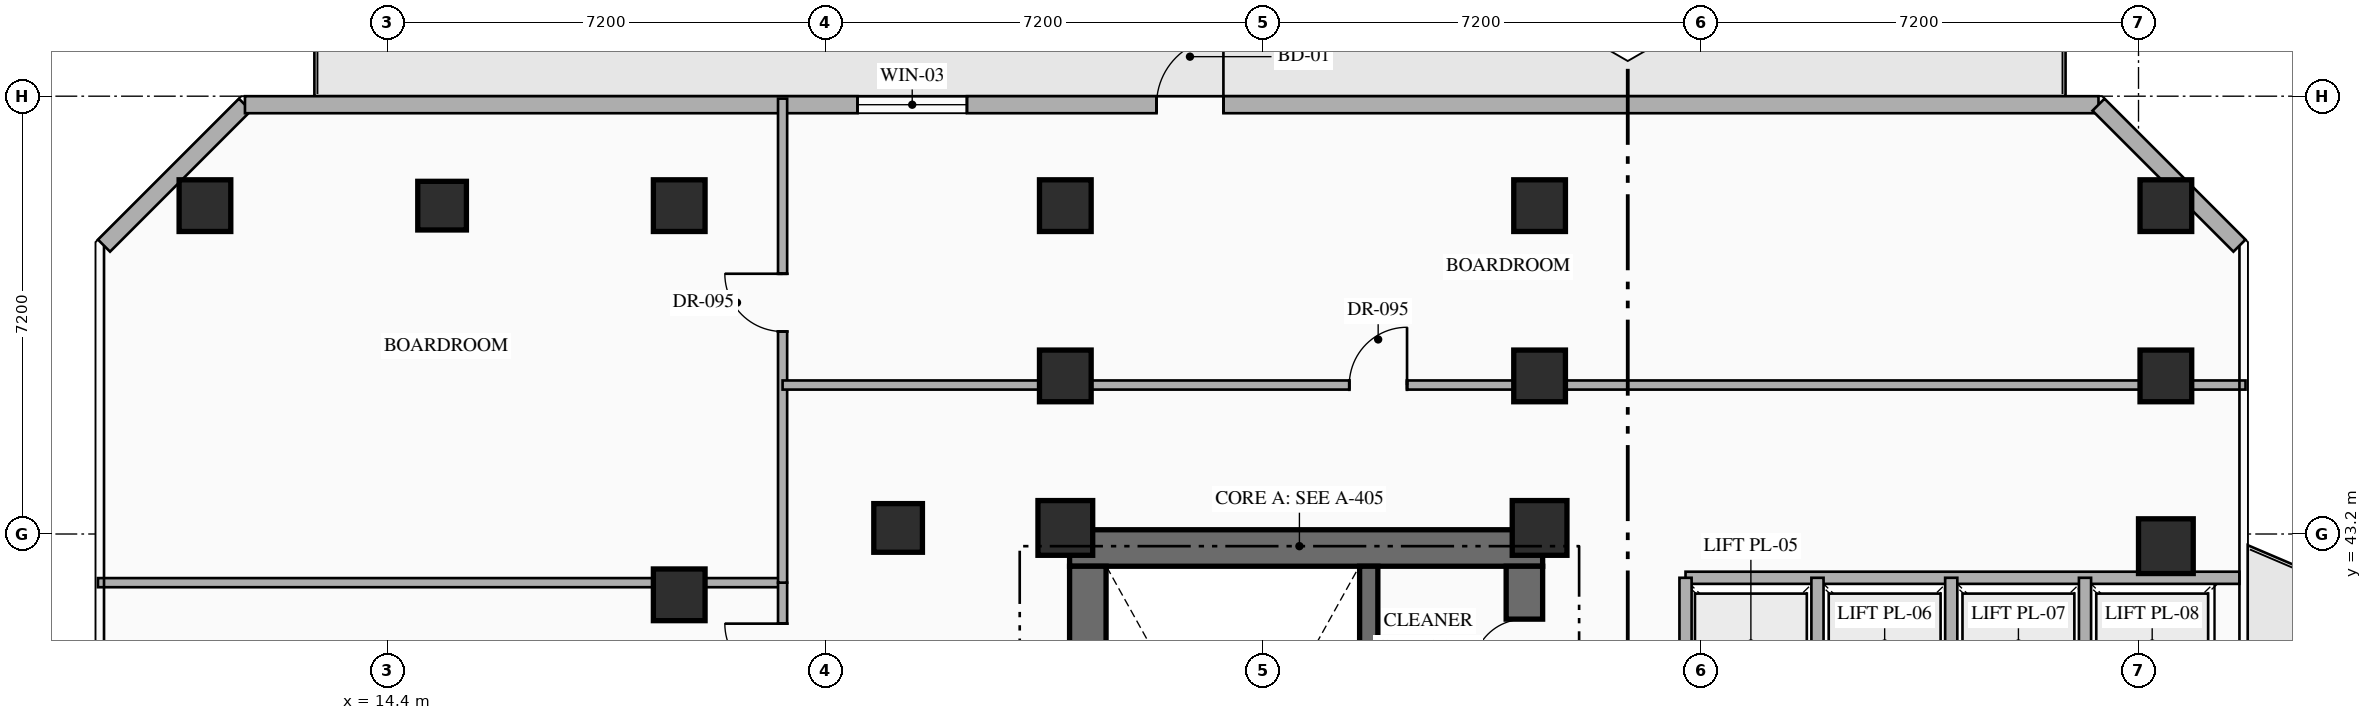
"""IFC4 building model, lengths in metres.
Left out: names, types, materials, properties, quantities, classifications, styles, units other than length and angle.
Written with IfcOpenShell. Run it as: python <this file> out.ifc"""

import sys

from ifc_helpers import new_model, si_unit, direction, frame, frame_2d, origin, origin_2d, place, context, subcontext, project, spatial, rectangle, hollow_rectangle, extrude, element, fill, save


model = new_model("IFC4")
c1 = context("Model", 3, precision=1e-05, world=origin(), true_north=direction((0.0, 1.0)))
c2 = subcontext(c1, "Body", "Model", "MODEL_VIEW")
j1 = project(units=[si_unit("LENGTHUNIT", "METRE"), si_unit("PLANEANGLEUNIT", "RADIAN")], contexts=[c1])
p1 = place(None, origin())
s1 = spatial("IfcSite", under=j1, at=p1, CompositionType="ELEMENT")
p2 = place(p1, origin())
s2 = spatial("IfcBuilding", under=s1, at=p2, CompositionType="ELEMENT")
p3 = place(p2, frame((0.0, 0.0, 130.05)))
s3 = spatial("IfcBuildingStorey", under=s2, at=p3, CompositionType="ELEMENT", Elevation=130.05)
p4 = place(p3, frame((25.62, 42.97, 0.0), z_axis=(0.0, 0.0, 1.0), x_axis=(1.0, 0.0, 0.0)))
e1 = element("IfcWall", 1, at=p4, inside=s3, PredefinedType="SHEAR", context=c2, shape_type="SweptSolid", body=[
    extrude(rectangle(XDim=7.78, YDim=0.6, at=frame_2d((3.89, 0.0))), origin(), (0.0, 0.0, 1.0), 4.8),
])
p5 = place(p3, frame((25.92, 33.19, 0.0), z_axis=(0.0, 0.0, 1.0), x_axis=(0.0, 1.0, 0.0)))
e2 = element("IfcWall", 2, at=p5, inside=s3, PredefinedType="SHEAR", context=c2, shape_type="SweptSolid", body=[
    extrude(rectangle(XDim=9.48, YDim=0.6, at=frame_2d((4.74, 0.0))), origin(), (0.0, 0.0, 1.0), 4.8),
])
p6 = place(p3, frame((33.1, 33.19, 0.0), z_axis=(0.0, 0.0, 1.0), x_axis=(0.0, 1.0, 0.0)))
e3 = element("IfcWall", 3, at=p6, inside=s3, PredefinedType="SHEAR", context=c2, shape_type="SweptSolid", body=[
    extrude(rectangle(XDim=9.48, YDim=0.6, at=frame_2d((4.74, 0.0))), origin(), (0.0, 0.0, 1.0), 4.8),
])
p7 = place(p6, frame((4.71, 0.0, 0.0)))
e4 = element("IfcOpeningElement", 4, at=p7, cuts=e3, PredefinedType="OPENING", context=c2, shape_type="SweptSolid", body=[
    extrude(rectangle(XDim=0.85, YDim=2.08, at=frame_2d((0.425, 1.04))), frame((0.0, 0.31, 0.0), z_axis=(0.0, -1.0, 0.0), x_axis=(1.0, 0.0, 0.0)), (0.0, 0.0, 1.0), 0.62),
])
p8 = place(p6, frame((7.76, 0.0, 0.0)))
e5 = element("IfcOpeningElement", 5, at=p8, cuts=e3, PredefinedType="OPENING", context=c2, shape_type="SweptSolid", body=[
    extrude(rectangle(XDim=0.85, YDim=2.08, at=frame_2d((0.425, 1.04))), frame((0.0, 0.31, 0.0), z_axis=(0.0, -1.0, 0.0), x_axis=(1.0, 0.0, 0.0)), (0.0, 0.0, 1.0), 0.62),
])
p9 = place(p3, frame((30.54, 33.19, 0.0), z_axis=(0.0, 0.0, 1.0), x_axis=(0.0, 1.0, 0.0)))
e6 = element("IfcWall", 6, at=p9, inside=s3, PredefinedType="SHEAR", context=c2, shape_type="SweptSolid", body=[
    extrude(rectangle(XDim=9.48, YDim=0.3, at=frame_2d((4.74, 0.0))), origin(), (0.0, 0.0, 1.0), 4.8),
])
for number, where, z_axis, x_axis in (
    (7, (25.55, 43.3, 0.0), (0.0, 0.0, 1.0), (1.0, 0.0, 0.0)),
    (8, (33.35, 43.3, 0.0), (0.0, 0.0, 1.0), (1.0, 0.0, 0.0)),
    (9, (43.65, 43.0, 0.0), (0.0, 0.0, 1.0), (1.0, 0.0, 0.0)),
):
    element("IfcColumn", number, at=place(p3, frame(where, z_axis=z_axis, x_axis=x_axis)), inside=s3, PredefinedType="COLUMN", context=c2, shape_type="SweptSolid", body=[
        extrude(rectangle(XDim=0.9, YDim=0.9, at=origin_2d()), origin(), (0.0, 0.0, 1.0), 4.8),
    ])
for number, where, z_axis, x_axis in (
    (10, (25.55, 45.8, 0.0), (0.0, 0.0, 1.0), (1.0, 0.0, 0.0)),
    (11, (33.35, 45.8, 0.0), (0.0, 0.0, 1.0), (1.0, 0.0, 0.0)),
    (12, (43.65, 45.8, 0.0), (0.0, 0.0, 1.0), (1.0, 0.0, 0.0)),
    (13, (11.4, 48.6, 0.0), (0.0, 0.0, 1.0), (1.0, 0.0, 0.0)),
    (14, (19.2, 48.6, 0.0), (0.0, 0.0, 1.0), (1.0, 0.0, 0.0)),
    (15, (25.55, 48.6, 0.0), (0.0, 0.0, 1.0), (1.0, 0.0, 0.0)),
    (16, (33.35, 48.6, 0.0), (0.0, 0.0, 1.0), (1.0, 0.0, 0.0)),
    (17, (43.65, 48.6, 0.0), (0.0, 0.0, 1.0), (1.0, 0.0, 0.0)),
    (18, (19.2, 42.2, 0.0), (0.0, 0.0, 1.0), (1.0, 0.0, 0.0)),
):
    element("IfcColumn", number, at=place(p3, frame(where, z_axis=z_axis, x_axis=x_axis)), inside=s3, PredefinedType="COLUMN", context=c2, shape_type="SweptSolid", body=[
        extrude(hollow_rectangle(XDim=0.85, YDim=0.85, WallThickness=0.032, at=origin_2d()), origin(), (0.0, 0.0, 1.0), 4.8),
    ])
for number, where, z_axis, x_axis in (
    (19, (22.8, 43.3, 0.0), (0.0, 0.0, 1.0), (1.0, 0.0, 0.0)),
    (20, (15.3, 48.6, 0.0), (0.0, 0.0, 1.0), (1.0, 0.0, 0.0)),
):
    element("IfcColumn", number, at=place(p3, frame(where, z_axis=z_axis, x_axis=x_axis)), inside=s3, PredefinedType="COLUMN", context=c2, shape_type="SweptSolid", body=[
        extrude(hollow_rectangle(XDim=0.8, YDim=0.8, WallThickness=0.032, at=origin_2d()), origin(), (0.0, 0.0, 1.0), 4.8),
    ])
p10 = place(p3, frame((9.74, 47.942, 0.0), z_axis=(0.0, 0.0, 1.0), x_axis=(0.707106781187, 0.707106781187, 0.0)))
e21 = element("IfcWall", 21, at=p10, inside=s3, PredefinedType="STANDARD", context=c2, shape_type="SweptSolid", body=[
    extrude(rectangle(XDim=3.278, YDim=0.28, at=frame_2d((1.639, 0.0))), origin(), (0.0, 0.0, 1.0), 4.55),
])
p11 = place(p3, frame((12.058, 50.26, 0.0), z_axis=(0.0, 0.0, 1.0), x_axis=(1.0, 0.0, 0.0)))
e22 = element("IfcWall", 22, at=p11, inside=s3, PredefinedType="STANDARD", context=c2, shape_type="SweptSolid", body=[
    extrude(rectangle(XDim=30.484, YDim=0.28, at=frame_2d((15.242, 0.0))), origin(), (0.0, 0.0, 1.0), 4.55),
])
p12 = place(p11, frame((14.992, 0.0, 0.0)))
e23 = element("IfcOpeningElement", 23, at=p12, cuts=e22, PredefinedType="OPENING", context=c2, shape_type="SweptSolid", body=[
    extrude(rectangle(XDim=1.1, YDim=2.2, at=frame_2d((0.55, 1.1))), frame((0.0, 0.15, 0.0), z_axis=(0.0, -1.0, 0.0), x_axis=(1.0, 0.0, 0.0)), (0.0, 0.0, 1.0), 0.3),
])
p13 = place(p11, frame((10.074, 0.0, 0.85)))
e24 = element("IfcOpeningElement", 24, at=p13, cuts=e22, PredefinedType="OPENING", context=c2, shape_type="SweptSolid", body=[
    extrude(rectangle(XDim=1.8, YDim=2.1, at=frame_2d((0.9, 1.05))), frame((0.0, 0.15, 0.0), z_axis=(0.0, -1.0, 0.0), x_axis=(1.0, 0.0, 0.0)), (0.0, 0.0, 1.0), 0.3),
])
p14 = place(p3, frame((42.542, 50.26, 0.0), z_axis=(0.0, 0.0, 1.0), x_axis=(0.707106781187, -0.707106781187, 0.0)))
e25 = element("IfcWall", 25, at=p14, inside=s3, PredefinedType="STANDARD", context=c2, shape_type="SweptSolid", body=[
    extrude(rectangle(XDim=3.278, YDim=0.28, at=frame_2d((1.639, 0.0))), origin(), (0.0, 0.0, 1.0), 4.55),
])
p15 = place(p3, frame((35.75, 42.48, 0.0), z_axis=(0.0, 0.0, 1.0), x_axis=(1.0, 0.0, 0.0)))
e26 = element("IfcWall", 26, at=p15, inside=s3, PredefinedType="STANDARD", context=c2, shape_type="SweptSolid", body=[
    extrude(rectangle(XDim=9.11, YDim=0.2, at=frame_2d((4.555, 0.0))), origin(), (0.0, 0.0, 1.0), 4.55),
])
for number, where, z_axis, x_axis in (
    (27, (35.75, 40.32, 0.0), (0.0, 0.0, 1.0), (0.0, 1.0, 0.0)),
    (28, (37.92, 40.32, 0.0), (0.0, 0.0, 1.0), (0.0, 1.0, 0.0)),
    (29, (40.12, 40.32, 0.0), (0.0, 0.0, 1.0), (0.0, 1.0, 0.0)),
    (30, (42.32, 40.32, 0.0), (0.0, 0.0, 1.0), (0.0, 1.0, 0.0)),
):
    element("IfcWall", number, at=place(p3, frame(where, z_axis=z_axis, x_axis=x_axis)), inside=s3, PredefinedType="STANDARD", context=c2, shape_type="SweptSolid", body=[
        extrude(rectangle(XDim=2.16, YDim=0.2, at=frame_2d((1.08, 0.0))), origin(), (0.0, 0.0, 1.0), 4.55),
    ])
p16 = place(p3, frame((9.64, 42.4, 0.0), z_axis=(0.0, 0.0, 1.0), x_axis=(1.0, 0.0, 0.0)))
e31 = element("IfcWall", 31, at=p16, inside=s3, PredefinedType="PARTITIONING", context=c2, shape_type="SweptSolid", body=[
    extrude(rectangle(XDim=11.26, YDim=0.15, at=frame_2d((5.63, 0.0))), origin(), (0.0, 0.0, 1.0), 4.55),
])
p17 = place(p3, frame((20.9, 34.8, 0.0), z_axis=(0.0, 0.0, 1.0), x_axis=(0.0, 1.0, 0.0)))
e32 = element("IfcWall", 32, at=p17, inside=s3, PredefinedType="PARTITIONING", context=c2, shape_type="SweptSolid", body=[
    extrude(rectangle(XDim=7.6, YDim=0.15, at=frame_2d((3.8, 0.0))), origin(), (0.0, 0.0, 1.0), 4.55),
])
p18 = place(p17, frame((5.976, 0.0, 0.0)))
e33 = element("IfcOpeningElement", 33, at=p18, cuts=e32, PredefinedType="OPENING", context=c2, shape_type="SweptSolid", body=[
    extrude(rectangle(XDim=0.95, YDim=2.15, at=frame_2d((0.475, 1.075))), frame((0.0, 0.085, 0.0), z_axis=(0.0, -1.0, 0.0), x_axis=(1.0, 0.0, 0.0)), (0.0, 0.0, 1.0), 0.17),
])
p19 = place(p3, frame((20.9, 42.4, 0.0), z_axis=(0.0, 0.0, 1.0), x_axis=(0.0, 1.0, 0.0)))
e34 = element("IfcWall", 34, at=p19, inside=s3, PredefinedType="PARTITIONING", context=c2, shape_type="SweptSolid", body=[
    extrude(rectangle(XDim=7.96, YDim=0.15, at=frame_2d((3.98, 0.0))), origin(), (0.0, 0.0, 1.0), 4.55),
])
p20 = place(p19, frame((4.13, 0.0, 0.0)))
e35 = element("IfcOpeningElement", 35, at=p20, cuts=e34, PredefinedType="OPENING", context=c2, shape_type="SweptSolid", body=[
    extrude(rectangle(XDim=0.95, YDim=2.15, at=frame_2d((0.475, 1.075))), frame((0.0, 0.085, 0.0), z_axis=(0.0, -1.0, 0.0), x_axis=(1.0, 0.0, 0.0)), (0.0, 0.0, 1.0), 0.17),
])
p21 = place(p3, frame((20.9, 45.65, 0.0), z_axis=(0.0, 0.0, 1.0), x_axis=(1.0, 0.0, 0.0)))
e36 = element("IfcWall", 36, at=p21, inside=s3, PredefinedType="PARTITIONING", context=c2, shape_type="SweptSolid", body=[
    extrude(rectangle(XDim=24.06, YDim=0.15, at=frame_2d((12.03, 0.0))), origin(), (0.0, 0.0, 1.0), 3.745),
])
p22 = place(p21, frame((9.32, 0.0, 0.0)))
e37 = element("IfcOpeningElement", 37, at=p22, cuts=e36, PredefinedType="OPENING", context=c2, shape_type="SweptSolid", body=[
    extrude(rectangle(XDim=0.95, YDim=2.15, at=frame_2d((0.475, 1.075))), frame((0.0, 0.085, 0.0), z_axis=(0.0, -1.0, 0.0), x_axis=(1.0, 0.0, 0.0)), (0.0, 0.0, 1.0), 0.17),
])
p23 = place(p12, origin())
e38 = element("IfcDoor", 38, at=p23, inside=s3, OperationType="SINGLE_SWING_RIGHT", PredefinedType="DOOR", context=c2, shape_type="SweptSolid", body=[
    extrude(rectangle(XDim=1.1, YDim=2.2, at=frame_2d((0.55, 1.1))), frame((0.0, 0.025, 0.0), z_axis=(0.0, -1.0, 0.0), x_axis=(1.0, 0.0, 0.0)), (0.0, 0.0, 1.0), 0.05),
])
fill(e23, e38)
p24 = place(p13, origin())
e39 = element("IfcWindow", 39, at=p24, inside=s3, PartitioningType="SINGLE_PANEL", PredefinedType="WINDOW", context=c2, shape_type="SweptSolid", body=[
    extrude(rectangle(XDim=1.8, YDim=2.1, at=frame_2d((0.9, 1.05))), frame((0.0, 0.03, 0.0), z_axis=(0.0, -1.0, 0.0), x_axis=(1.0, 0.0, 0.0)), (0.0, 0.0, 1.0), 0.06),
])
fill(e24, e39)
p25 = place(p8, origin())
e40 = element("IfcDoor", 40, at=p25, inside=s3, OperationType="SINGLE_SWING_LEFT", PredefinedType="DOOR", context=c2, shape_type="SweptSolid", body=[
    extrude(rectangle(XDim=0.85, YDim=2.08, at=frame_2d((0.425, 1.04))), frame((0.0, 0.025, 0.0), z_axis=(0.0, -1.0, 0.0), x_axis=(1.0, 0.0, 0.0)), (0.0, 0.0, 1.0), 0.05),
])
fill(e5, e40)
p26 = place(p18, origin())
e41 = element("IfcDoor", 41, at=p26, inside=s3, OperationType="SINGLE_SWING_RIGHT", PredefinedType="DOOR", context=c2, shape_type="SweptSolid", body=[
    extrude(rectangle(XDim=0.95, YDim=2.15, at=frame_2d((0.475, 1.075))), frame((0.0, 0.025, 0.0), z_axis=(0.0, -1.0, 0.0), x_axis=(1.0, 0.0, 0.0)), (0.0, 0.0, 1.0), 0.05),
])
fill(e33, e41)
p27 = place(p20, origin())
e42 = element("IfcDoor", 42, at=p27, inside=s3, OperationType="SINGLE_SWING_RIGHT", PredefinedType="DOOR", context=c2, shape_type="SweptSolid", body=[
    extrude(rectangle(XDim=0.95, YDim=2.15, at=frame_2d((0.475, 1.075))), frame((0.0, 0.025, 0.0), z_axis=(0.0, -1.0, 0.0), x_axis=(1.0, 0.0, 0.0)), (0.0, 0.0, 1.0), 0.05),
])
fill(e35, e42)
p28 = place(p22, origin())
e43 = element("IfcDoor", 43, at=p28, inside=s3, OperationType="SINGLE_SWING_RIGHT", PredefinedType="DOOR", context=c2, shape_type="SweptSolid", body=[
    extrude(rectangle(XDim=0.95, YDim=2.15, at=frame_2d((0.475, 1.075))), frame((0.0, 0.025, 0.0), z_axis=(0.0, -1.0, 0.0), x_axis=(1.0, 0.0, 0.0)), (0.0, 0.0, 1.0), 0.05),
])
fill(e37, e43)
save(model, sys.argv[1])
